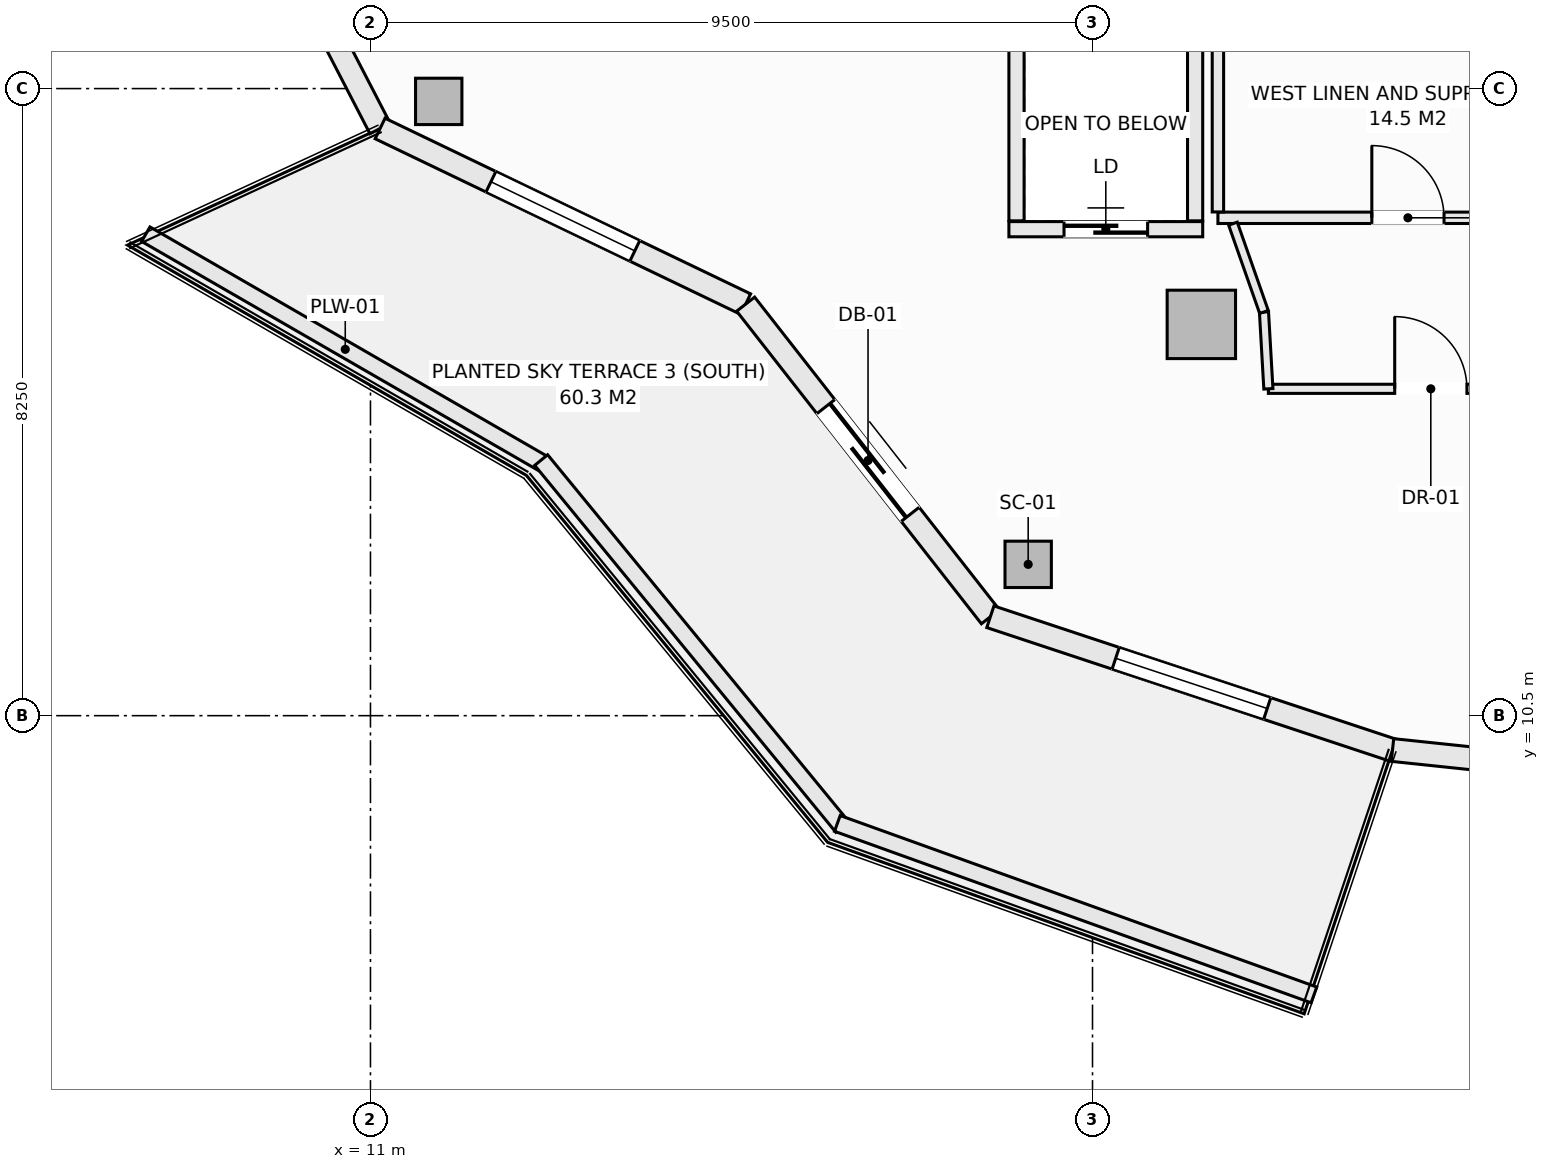
"""IFC4 building model, lengths in metres.
Left out: names, types, materials, properties, quantities, classifications, styles, units other than length and angle.
Written with IfcOpenShell. Run it as: python <this file> out.ifc"""

import sys

from ifc_helpers import new_model, si_unit, direction, frame, frame_2d, origin, origin_2d, place, context, subcontext, project, spatial, rectangle, hollow_rectangle, extrude, element, fill, save


model = new_model("IFC4")
c1 = context("Model", 3, precision=1e-05, world=origin(), true_north=direction((0.0, 1.0)))
c2 = subcontext(c1, "Body", "Model", "MODEL_VIEW")
j1 = project(units=[si_unit("LENGTHUNIT", "METRE"), si_unit("PLANEANGLEUNIT", "RADIAN")], contexts=[c1])
p1 = place(None, origin())
s1 = spatial("IfcSite", under=j1, at=p1, CompositionType="ELEMENT")
p2 = place(p1, origin())
s2 = spatial("IfcBuilding", under=s1, at=p2, CompositionType="ELEMENT")
p3 = place(p2, frame((0.0, 0.0, 142.7)))
s3 = spatial("IfcBuildingStorey", under=s2, at=p3, CompositionType="ELEMENT", Elevation=142.7)
for number, where, z_axis, x_axis in (
    (1, (11.898, 18.581, -0.27), (0.0, 0.0, 1.0), (1.0, 0.0, 0.0)),
    (2, (19.654, 12.49, -0.27), (0.0, 0.0, 1.0), (1.0, 0.0, 0.0)),
):
    element("IfcColumn", number, at=place(p3, frame(where, z_axis=z_axis, x_axis=x_axis)), inside=s3, PredefinedType="COLUMN", context=c2, shape_type="SweptSolid", body=[
        extrude(hollow_rectangle(XDim=0.61, YDim=0.61, WallThickness=0.025, at=origin_2d()), origin(), (0.0, 0.0, 1.0), 3.4),
    ])
p4 = place(p3, frame((21.932, 15.648, -0.27), z_axis=(0.0, 0.0, 1.0), x_axis=(1.0, 0.0, 0.0)))
e3 = element("IfcColumn", 3, at=p4, inside=s3, PredefinedType="COLUMN", context=c2, shape_type="SweptSolid", body=[
    extrude(rectangle(XDim=0.9, YDim=0.9, at=origin_2d()), origin(), (0.0, 0.0, 1.0), 3.4),
])
p5 = place(p3, frame((8.935, 22.458, 0.0), z_axis=(0.0, 0.0, 1.0), x_axis=(0.459810251451, -0.888017191647, 0.0)))
e4 = element("IfcWall", 4, at=p5, inside=s3, PredefinedType="SOLIDWALL", context=c2, shape_type="SweptSolid", body=[
    extrude(rectangle(XDim=4.766, YDim=0.3, at=frame_2d((2.383, 0.0))), origin(), (0.0, 0.0, 1.0), 2.653),
])
p6 = place(p5, frame((1.333, 0.0, 0.74)))
e5 = element("IfcOpeningElement", 5, at=p6, cuts=e4, PredefinedType="OPENING", context=c2, shape_type="SweptSolid", body=[
    extrude(rectangle(XDim=2.1, YDim=1.7, at=frame_2d((1.05, 0.85))), frame((0.0, 0.16, 0.0), z_axis=(0.0, -1.0, 0.0), x_axis=(1.0, 0.0, 0.0)), (0.0, 0.0, 1.0), 0.32),
])
p7 = place(p3, frame((11.127, 18.225, 0.0), z_axis=(0.0, 0.0, 1.0), x_axis=(0.901353070301, -0.433085029363, 0.0)))
e6 = element("IfcWall", 6, at=p7, inside=s3, PredefinedType="SOLIDWALL", context=c2, shape_type="SweptSolid", body=[
    extrude(rectangle(XDim=5.336, YDim=0.3, at=frame_2d((2.668, 0.0))), origin(), (0.0, 0.0, 1.0), 2.653),
])
p8 = place(p7, frame((1.618, 0.0, 0.74)))
e7 = element("IfcOpeningElement", 7, at=p8, cuts=e6, PredefinedType="OPENING", context=c2, shape_type="SweptSolid", body=[
    extrude(rectangle(XDim=2.1, YDim=1.7, at=frame_2d((1.05, 0.85))), frame((0.0, 0.16, 0.0), z_axis=(0.0, -1.0, 0.0), x_axis=(1.0, 0.0, 0.0)), (0.0, 0.0, 1.0), 0.32),
])
p9 = place(p3, frame((15.937, 15.914, 0.0), z_axis=(0.0, 0.0, 1.0), x_axis=(0.616429245738, -0.787410302828, 0.0)))
e8 = element("IfcWall", 8, at=p9, inside=s3, PredefinedType="SOLIDWALL", context=c2, shape_type="SweptSolid", body=[
    extrude(rectangle(XDim=5.223, YDim=0.3, at=frame_2d((2.612, 0.0))), origin(), (0.0, 0.0, 1.0), 2.653),
])
p10 = place(p9, frame((1.712, 0.0, 0.0)))
e9 = element("IfcOpeningElement", 9, at=p10, cuts=e8, PredefinedType="OPENING", context=c2, shape_type="SweptSolid", body=[
    extrude(rectangle(XDim=1.8, YDim=2.25, at=frame_2d((0.9, 1.125))), frame((0.0, 0.16, 0.0), z_axis=(0.0, -1.0, 0.0), x_axis=(1.0, 0.0, 0.0)), (0.0, 0.0, 1.0), 0.32),
])
p11 = place(p3, frame((19.156, 11.801, 0.0), z_axis=(0.0, 0.0, 1.0), x_axis=(0.949246811547, -0.314532177636, 0.0)))
e10 = element("IfcWall", 10, at=p11, inside=s3, PredefinedType="SOLIDWALL", context=c2, shape_type="SweptSolid", body=[
    extrude(rectangle(XDim=5.574, YDim=0.3, at=frame_2d((2.787, 0.0))), origin(), (0.0, 0.0, 1.0), 2.653),
])
p12 = place(p11, frame((1.737, 0.0, 0.74)))
e11 = element("IfcOpeningElement", 11, at=p12, cuts=e10, PredefinedType="OPENING", context=c2, shape_type="SweptSolid", body=[
    extrude(rectangle(XDim=2.1, YDim=1.7, at=frame_2d((1.05, 0.85))), frame((0.0, 0.16, 0.0), z_axis=(0.0, -1.0, 0.0), x_axis=(1.0, 0.0, 0.0)), (0.0, 0.0, 1.0), 0.32),
])
p13 = place(p3, frame((24.447, 10.048, 0.0), z_axis=(0.0, 0.0, 1.0), x_axis=(0.994496545245, -0.104769372887, 0.0)))
e12 = element("IfcWall", 12, at=p13, inside=s3, PredefinedType="SOLIDWALL", context=c2, shape_type="SweptSolid", body=[
    extrude(rectangle(XDim=5.709, YDim=0.3, at=frame_2d((2.854, 0.0))), origin(), (0.0, 0.0, 1.0), 2.653),
])
p14 = place(p13, frame((1.805, 0.0, 0.74)))
e13 = element("IfcOpeningElement", 13, at=p14, cuts=e12, PredefinedType="OPENING", context=c2, shape_type="SweptSolid", body=[
    extrude(rectangle(XDim=2.1, YDim=1.7, at=frame_2d((1.05, 0.85))), frame((0.0, 0.16, 0.0), z_axis=(0.0, -1.0, 0.0), x_axis=(1.0, 0.0, 0.0)), (0.0, 0.0, 1.0), 0.32),
])
p15 = place(p3, frame((8.044, 16.834, 0.0), z_axis=(0.0, 0.0, 1.0), x_axis=(0.866058128659, -0.499943314571, 0.0)))
e14 = element("IfcWall", 14, at=p15, inside=s3, PredefinedType="PARAPET", context=c2, shape_type="SweptSolid", body=[
    extrude(rectangle(XDim=6.06, YDim=0.22, at=frame_2d((3.03, 0.0))), origin(), (0.0, 0.0, 1.0), 0.52),
])
p16 = place(p3, frame((13.246, 13.863, 0.0), z_axis=(0.0, 0.0, 1.0), x_axis=(0.634429234628, -0.77298094818, 0.0)))
e15 = element("IfcWall", 15, at=p16, inside=s3, PredefinedType="PARAPET", context=c2, shape_type="SweptSolid", body=[
    extrude(rectangle(XDim=6.245, YDim=0.22, at=frame_2d((3.123, 0.0))), origin(), (0.0, 0.0, 1.0), 0.52),
])
p17 = place(p3, frame((17.143, 9.082, 0.0), z_axis=(0.0, 0.0, 1.0), x_axis=(0.940948576924, -0.338549517184, 0.0)))
e16 = element("IfcWall", 16, at=p17, inside=s3, PredefinedType="PARAPET", context=c2, shape_type="SweptSolid", body=[
    extrude(rectangle(XDim=6.664, YDim=0.22, at=frame_2d((3.332, 0.0))), origin(), (0.0, 0.0, 1.0), 0.52),
])
p18 = place(p3, frame((19.4, 16.9, 0.0), z_axis=(0.0, 0.0, 1.0), x_axis=(1.0, 0.0, 0.0)))
e17 = element("IfcWall", 17, at=p18, inside=s3, PredefinedType="SOLIDWALL", context=c2, shape_type="SweptSolid", body=[
    extrude(rectangle(XDim=2.55, YDim=0.2, at=frame_2d((1.275, 0.0))), origin(), (0.0, 0.0, 1.0), 3.13),
])
p19 = place(p18, frame((0.725, 0.0, 0.0)))
e18 = element("IfcOpeningElement", 18, at=p19, cuts=e17, PredefinedType="OPENING", context=c2, shape_type="SweptSolid", body=[
    extrude(rectangle(XDim=1.1, YDim=2.2, at=frame_2d((0.55, 1.1))), frame((0.0, 0.11, 0.0), z_axis=(0.0, -1.0, 0.0), x_axis=(1.0, 0.0, 0.0)), (0.0, 0.0, 1.0), 0.22),
])
for number, where, z_axis, x_axis in (
    (19, (19.5, 17.01, 0.0), (0.0, 0.0, 1.0), (0.0, 1.0, 0.0)),
    (20, (21.85, 17.01, 0.0), (0.0, 0.0, 1.0), (0.0, 1.0, 0.0)),
):
    element("IfcWall", number, at=place(p3, frame(where, z_axis=z_axis, x_axis=x_axis)), inside=s3, PredefinedType="SOLIDWALL", context=c2, shape_type="SweptSolid", body=[
        extrude(rectangle(XDim=2.53, YDim=0.2, at=frame_2d((1.265, 0.0))), origin(), (0.0, 0.0, 1.0), 3.13),
    ])
p20 = place(p3, frame((22.15, 17.05, 0.0), z_axis=(0.0, 0.0, 1.0), x_axis=(1.0, 0.0, 0.0)))
e21 = element("IfcWall", 21, at=p20, inside=s3, PredefinedType="PARTITIONING", context=c2, shape_type="SweptSolid", body=[
    extrude(rectangle(XDim=5.0, YDim=0.15, at=frame_2d((2.5, 0.0))), origin(), (0.0, 0.0, 1.0), 3.13),
])
p21 = place(p20, frame((2.025, 0.0, 0.0)))
e22 = element("IfcOpeningElement", 22, at=p21, cuts=e21, PredefinedType="OPENING", context=c2, shape_type="SweptSolid", body=[
    extrude(rectangle(XDim=0.95, YDim=2.1, at=frame_2d((0.475, 1.05))), frame((0.0, 0.085, 0.0), z_axis=(0.0, -1.0, 0.0), x_axis=(1.0, 0.0, 0.0)), (0.0, 0.0, 1.0), 0.17),
])
p22 = place(p3, frame((22.15, 17.127, 0.0), z_axis=(0.0, 0.0, 1.0), x_axis=(0.0, 1.0, 0.0)))
e23 = element("IfcWall", 23, at=p22, inside=s3, PredefinedType="PARTITIONING", context=c2, shape_type="SweptSolid", body=[
    extrude(rectangle(XDim=2.721, YDim=0.15, at=frame_2d((1.36, 0.0))), origin(), (0.0, 0.0, 1.0), 3.13),
])
p23 = place(p3, frame((22.814, 14.8, 0.0), z_axis=(0.0, 0.0, 1.0), x_axis=(1.0, 0.0, 0.0)))
e24 = element("IfcWall", 24, at=p23, inside=s3, PredefinedType="PARTITIONING", context=c2, shape_type="SweptSolid", body=[
    extrude(rectangle(XDim=4.274, YDim=0.12, at=frame_2d((2.137, 0.0))), origin(), (0.0, 0.0, 1.0), 3.13),
])
p24 = place(p23, frame((1.662, 0.0, 0.0)))
e25 = element("IfcOpeningElement", 25, at=p24, cuts=e24, PredefinedType="OPENING", context=c2, shape_type="SweptSolid", body=[
    extrude(rectangle(XDim=0.95, YDim=2.1, at=frame_2d((0.475, 1.05))), frame((0.0, 0.07, 0.0), z_axis=(0.0, -1.0, 0.0), x_axis=(1.0, 0.0, 0.0)), (0.0, 0.0, 1.0), 0.14),
])
p25 = place(p3, frame((22.756, 15.811, 0.0), z_axis=(0.0, 0.0, 1.0), x_axis=(0.057139047697, -0.998366230012, 0.0)))
e26 = element("IfcWall", 26, at=p25, inside=s3, PredefinedType="PARTITIONING", context=c2, shape_type="SweptSolid", body=[
    extrude(rectangle(XDim=1.013, YDim=0.12, at=frame_2d((0.506, 0.0))), origin(), (0.0, 0.0, 1.0), 3.13),
])
p26 = place(p3, frame((22.348, 16.973, 0.0), z_axis=(0.0, 0.0, 1.0), x_axis=(0.331471687044, -0.943465166653, 0.0)))
e27 = element("IfcWall", 27, at=p26, inside=s3, PredefinedType="PARTITIONING", context=c2, shape_type="SweptSolid", body=[
    extrude(rectangle(XDim=1.231, YDim=0.12, at=frame_2d((0.616, 0.0))), origin(), (0.0, 0.0, 1.0), 3.13),
])
p27 = place(p8, origin())
e28 = element("IfcWindow", 28, at=p27, inside=s3, PartitioningType="SINGLE_PANEL", PredefinedType="WINDOW", context=c2, shape_type="SweptSolid", body=[
    extrude(rectangle(XDim=2.1, YDim=1.7, at=frame_2d((1.05, 0.85))), frame((0.0, 0.03, 0.0), z_axis=(0.0, -1.0, 0.0), x_axis=(1.0, 0.0, 0.0)), (0.0, 0.0, 1.0), 0.06),
])
fill(e7, e28)
p28 = place(p10, frame((1.8, 0.0, 0.0), z_axis=(0.0, 0.0, 1.0), x_axis=(-1.0, 0.0, 0.0)))
e29 = element("IfcDoor", 29, at=p28, inside=s3, OperationType="SLIDING_TO_LEFT", PredefinedType="DOOR", context=c2, shape_type="SweptSolid", body=[
    extrude(rectangle(XDim=1.8, YDim=2.25, at=frame_2d((0.9, 1.125))), frame((0.0, 0.025, 0.0), z_axis=(0.0, -1.0, 0.0), x_axis=(1.0, 0.0, 0.0)), (0.0, 0.0, 1.0), 0.05),
])
fill(e9, e29)
p29 = place(p12, origin())
e30 = element("IfcWindow", 30, at=p29, inside=s3, PartitioningType="SINGLE_PANEL", PredefinedType="WINDOW", context=c2, shape_type="SweptSolid", body=[
    extrude(rectangle(XDim=2.1, YDim=1.7, at=frame_2d((1.05, 0.85))), frame((0.0, 0.03, 0.0), z_axis=(0.0, -1.0, 0.0), x_axis=(1.0, 0.0, 0.0)), (0.0, 0.0, 1.0), 0.06),
])
fill(e11, e30)
p30 = place(p19, origin())
e31 = element("IfcDoor", 31, at=p30, inside=s3, OperationType="SLIDING_TO_LEFT", PredefinedType="DOOR", context=c2, shape_type="SweptSolid", body=[
    extrude(rectangle(XDim=1.1, YDim=2.2, at=frame_2d((0.55, 1.1))), frame((0.0, 0.025, 0.0), z_axis=(0.0, -1.0, 0.0), x_axis=(1.0, 0.0, 0.0)), (0.0, 0.0, 1.0), 0.05),
])
fill(e18, e31)
p31 = place(p21, origin())
e32 = element("IfcDoor", 32, at=p31, inside=s3, OperationType="SINGLE_SWING_LEFT", PredefinedType="DOOR", context=c2, shape_type="SweptSolid", body=[
    extrude(rectangle(XDim=0.95, YDim=2.1, at=frame_2d((0.475, 1.05))), frame((0.0, 0.025, 0.0), z_axis=(0.0, -1.0, 0.0), x_axis=(1.0, 0.0, 0.0)), (0.0, 0.0, 1.0), 0.05),
])
fill(e22, e32)
p32 = place(p24, origin())
e33 = element("IfcDoor", 33, at=p32, inside=s3, OperationType="SINGLE_SWING_LEFT", PredefinedType="DOOR", context=c2, shape_type="SweptSolid", body=[
    extrude(rectangle(XDim=0.95, YDim=2.1, at=frame_2d((0.475, 1.05))), frame((0.0, 0.025, 0.0), z_axis=(0.0, -1.0, 0.0), x_axis=(1.0, 0.0, 0.0)), (0.0, 0.0, 1.0), 0.05),
])
fill(e25, e33)
save(model, sys.argv[1])
